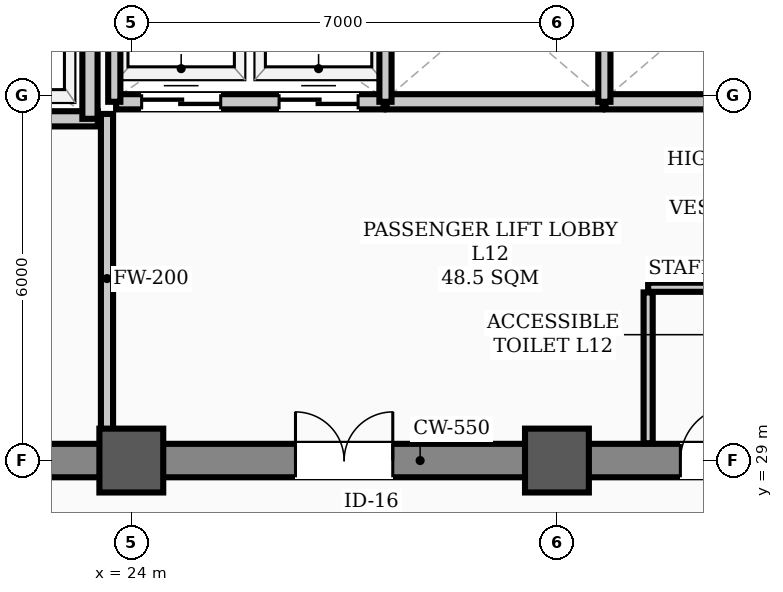
"""IFC4 building model, lengths in metres.
Left out: names, types, materials, properties, quantities, classifications, styles, units other than length and angle.
Written with IfcOpenShell. Run it as: python <this file> out.ifc"""

import sys

from ifc_helpers import new_model, si_unit, direction, frame, frame_2d, origin, origin_2d, place, context, subcontext, project, spatial, rectangle, hollow_rectangle, extrude, element, fill, save


model = new_model("IFC4")
c1 = context("Model", 3, precision=1e-05, world=origin(), true_north=direction((0.0, 1.0)))
c2 = subcontext(c1, "Body", "Model", "MODEL_VIEW")
j1 = project(units=[si_unit("LENGTHUNIT", "METRE"), si_unit("PLANEANGLEUNIT", "RADIAN")], contexts=[c1])
p1 = place(None, origin())
s1 = spatial("IfcSite", under=j1, at=p1, CompositionType="ELEMENT")
p2 = place(p1, origin())
s2 = spatial("IfcBuilding", under=s1, at=p2, CompositionType="ELEMENT")
p3 = place(p2, frame((0.0, 0.0, 49.9)))
s3 = spatial("IfcBuildingStorey", under=s2, at=p3, CompositionType="ELEMENT", Elevation=49.9)
for number, where, z_axis, x_axis in (
    (1, (24.0, 29.0, 0.0), (0.0, 0.0, 1.0), (1.0, 0.0, 0.0)),
    (2, (31.0, 29.0, 0.0), (0.0, 0.0, 1.0), (1.0, 0.0, 0.0)),
):
    element("IfcColumn", number, at=place(p3, frame(where, z_axis=z_axis, x_axis=x_axis)), inside=s3, PredefinedType="COLUMN", context=c2, shape_type="SweptSolid", body=[
        extrude(hollow_rectangle(XDim=1.05, YDim=1.05, WallThickness=0.038, InnerFilletRadius=0.019, OuterFilletRadius=0.057, at=origin_2d()), origin(), (0.0, 0.0, 1.0), 3.9),
    ])
p4 = place(p3, frame((13.5, 29.0, 0.0), z_axis=(0.0, 0.0, 1.0), x_axis=(1.0, 0.0, 0.0)))
e3 = element("IfcWall", 3, at=p4, inside=s3, PredefinedType="SHEAR", context=c2, shape_type="SweptSolid", body=[
    extrude(rectangle(XDim=30.5, YDim=0.55, at=frame_2d((15.25, 0.0))), origin(), (0.0, 0.0, 1.0), 3.66),
])
p5 = place(p4, frame((1.75, 0.0, 0.0)))
e4 = element("IfcOpeningElement", 4, at=p5, cuts=e3, PredefinedType="OPENING", context=c2, shape_type="SweptSolid", body=[
    extrude(rectangle(XDim=1.1, YDim=2.08, at=frame_2d((0.55, 1.04))), frame((0.0, 0.285, 0.0), z_axis=(0.0, -1.0, 0.0), x_axis=(1.0, 0.0, 0.0)), (0.0, 0.0, 1.0), 0.57),
])
p6 = place(p4, frame((26.7, 0.0, 0.0)))
e5 = element("IfcOpeningElement", 5, at=p6, cuts=e3, PredefinedType="OPENING", context=c2, shape_type="SweptSolid", body=[
    extrude(rectangle(XDim=1.1, YDim=2.08, at=frame_2d((0.55, 1.04))), frame((0.0, 0.285, 0.0), z_axis=(0.0, -1.0, 0.0), x_axis=(1.0, 0.0, 0.0)), (0.0, 0.0, 1.0), 0.57),
])
p7 = place(p4, frame((6.8, 0.0, 0.0)))
e6 = element("IfcOpeningElement", 6, at=p7, cuts=e3, PredefinedType="OPENING", context=c2, shape_type="SweptSolid", body=[
    extrude(rectangle(XDim=1.1, YDim=2.08, at=frame_2d((0.55, 1.04))), frame((0.0, 0.285, 0.0), z_axis=(0.0, -1.0, 0.0), x_axis=(1.0, 0.0, 0.0)), (0.0, 0.0, 1.0), 0.57),
])
p8 = place(p4, frame((13.2, 0.0, 0.0)))
e7 = element("IfcOpeningElement", 7, at=p8, cuts=e3, PredefinedType="OPENING", context=c2, shape_type="SweptSolid", body=[
    extrude(rectangle(XDim=1.6, YDim=2.08, at=frame_2d((0.8, 1.04))), frame((0.0, 0.285, 0.0), z_axis=(0.0, -1.0, 0.0), x_axis=(1.0, 0.0, 0.0)), (0.0, 0.0, 1.0), 0.57),
])
p9 = place(p4, frame((19.53, 0.0, 0.0)))
e8 = element("IfcOpeningElement", 8, at=p9, cuts=e3, PredefinedType="OPENING", context=c2, shape_type="SweptSolid", body=[
    extrude(rectangle(XDim=0.9, YDim=2.08, at=frame_2d((0.45, 1.04))), frame((0.0, 0.285, 0.0), z_axis=(0.0, -1.0, 0.0), x_axis=(1.0, 0.0, 0.0)), (0.0, 0.0, 1.0), 0.57),
])
p10 = place(p4, frame((21.57, 0.0, 0.0)))
e9 = element("IfcOpeningElement", 9, at=p10, cuts=e3, PredefinedType="OPENING", context=c2, shape_type="SweptSolid", body=[
    extrude(rectangle(XDim=0.9, YDim=2.08, at=frame_2d((0.45, 1.04))), frame((0.0, 0.285, 0.0), z_axis=(0.0, -1.0, 0.0), x_axis=(1.0, 0.0, 0.0)), (0.0, 0.0, 1.0), 0.57),
])
p11 = place(p3, frame((18.1, 34.62, 0.0), z_axis=(0.0, 0.0, 1.0), x_axis=(1.0, 0.0, 0.0)))
e10 = element("IfcWall", 10, at=p11, inside=s3, PredefinedType="STANDARD", context=c2, shape_type="SweptSolid", body=[
    extrude(rectangle(XDim=5.35, YDim=0.25, at=frame_2d((2.675, 0.0))), origin(), (0.0, 0.0, 1.0), 3.66),
])
p12 = place(p11, frame((0.85, 0.0, 0.0)))
e11 = element("IfcOpeningElement", 11, at=p12, cuts=e10, PredefinedType="OPENING", context=c2, shape_type="SweptSolid", body=[
    extrude(rectangle(XDim=1.1, YDim=2.08, at=frame_2d((0.55, 1.04))), frame((0.0, 0.135, 0.0), z_axis=(0.0, -1.0, 0.0), x_axis=(1.0, 0.0, 0.0)), (0.0, 0.0, 1.0), 0.27),
])
p13 = place(p11, frame((3.45, 0.0, 0.0)))
e12 = element("IfcOpeningElement", 12, at=p13, cuts=e10, PredefinedType="OPENING", context=c2, shape_type="SweptSolid", body=[
    extrude(rectangle(XDim=1.1, YDim=2.08, at=frame_2d((0.55, 1.04))), frame((0.0, 0.135, 0.0), z_axis=(0.0, -1.0, 0.0), x_axis=(1.0, 0.0, 0.0)), (0.0, 0.0, 1.0), 0.27),
])
p14 = place(p3, frame((23.32, 34.62, 0.0), z_axis=(0.0, 0.0, 1.0), x_axis=(0.0, 1.0, 0.0)))
e13 = element("IfcWall", 13, at=p14, inside=s3, PredefinedType="STANDARD", context=c2, shape_type="SweptSolid", body=[
    extrude(rectangle(XDim=3.33, YDim=0.25, at=frame_2d((1.665, 0.0))), origin(), (0.0, 0.0, 1.0), 2.24),
])
p15 = place(p3, frame((23.75, 34.9, 0.0), z_axis=(0.0, 0.0, 1.0), x_axis=(1.0, 0.0, 0.0)))
e14 = element("IfcWall", 14, at=p15, inside=s3, PredefinedType="STANDARD", context=c2, shape_type="SweptSolid", body=[
    extrude(rectangle(XDim=4.4, YDim=0.25, at=frame_2d((2.2, 0.0))), origin(), (0.0, 0.0, 1.0), 3.66),
])
p16 = place(p15, frame((0.42, 0.0, 0.0)))
e15 = element("IfcOpeningElement", 15, at=p16, cuts=e14, PredefinedType="OPENING", context=c2, shape_type="SweptSolid", body=[
    extrude(rectangle(XDim=1.3, YDim=2.08, at=frame_2d((0.65, 1.04))), frame((0.0, 0.135, 0.0), z_axis=(0.0, -1.0, 0.0), x_axis=(1.0, 0.0, 0.0)), (0.0, 0.0, 1.0), 0.27),
])
p17 = place(p15, frame((2.68, 0.0, 0.0)))
e16 = element("IfcOpeningElement", 16, at=p17, cuts=e14, PredefinedType="OPENING", context=c2, shape_type="SweptSolid", body=[
    extrude(rectangle(XDim=1.3, YDim=2.08, at=frame_2d((0.65, 1.04))), frame((0.0, 0.135, 0.0), z_axis=(0.0, -1.0, 0.0), x_axis=(1.0, 0.0, 0.0)), (0.0, 0.0, 1.0), 0.27),
])
p18 = place(p3, frame((28.2, 34.9, 0.0), z_axis=(0.0, 0.0, 1.0), x_axis=(1.0, 0.0, 0.0)))
e17 = element("IfcWall", 17, at=p18, inside=s3, PredefinedType="STANDARD", context=c2, shape_type="SweptSolid", body=[
    extrude(rectangle(XDim=3.55, YDim=0.25, at=frame_2d((1.775, 0.0))), origin(), (0.0, 0.0, 1.0), 3.66),
])
p19 = place(p3, frame((31.8, 34.9, 0.0), z_axis=(0.0, 0.0, 1.0), x_axis=(1.0, 0.0, 0.0)))
e18 = element("IfcWall", 18, at=p19, inside=s3, PredefinedType="STANDARD", context=c2, shape_type="SweptSolid", body=[
    extrude(rectangle(XDim=3.6, YDim=0.25, at=frame_2d((1.8, 0.0))), origin(), (0.0, 0.0, 1.0), 3.66),
])
p20 = place(p3, frame((32.5, 31.85, 0.0), z_axis=(0.0, 0.0, 1.0), x_axis=(1.0, 0.0, 0.0)))
e19 = element("IfcWall", 19, at=p20, inside=s3, PredefinedType="PARTITIONING", context=c2, shape_type="SweptSolid", body=[
    extrude(rectangle(XDim=4.1, YDim=0.15, at=frame_2d((2.05, 0.0))), origin(), (0.0, 0.0, 1.0), 3.66),
])
p21 = place(p3, frame((23.6, 29.285, 0.0), z_axis=(0.0, 0.0, 1.0), x_axis=(0.0, 1.0, 0.0)))
e20 = element("IfcWall", 20, at=p21, inside=s3, PredefinedType="STANDARD", context=c2, shape_type="SweptSolid", body=[
    extrude(rectangle(XDim=5.415, YDim=0.2, at=frame_2d((2.708, 0.0))), origin(), (0.0, 0.0, 1.0), 2.24),
])
p22 = place(p3, frame((32.5, 29.285, 0.0), z_axis=(0.0, 0.0, 1.0), x_axis=(0.0, 1.0, 0.0)))
e21 = element("IfcWall", 21, at=p22, inside=s3, PredefinedType="PARTITIONING", context=c2, shape_type="SweptSolid", body=[
    extrude(rectangle(XDim=2.48, YDim=0.15, at=frame_2d((1.24, 0.0))), origin(), (0.0, 0.0, 1.0), 2.24),
])
for number, where, z_axis, x_axis in (
    (22, (23.72, 34.9, 0.0), (0.0, 0.0, 1.0), (0.0, 1.0, 0.0)),
    (23, (28.18, 34.9, 0.0), (0.0, 0.0, 1.0), (0.0, 1.0, 0.0)),
    (24, (31.78, 34.9, 0.0), (0.0, 0.0, 1.0), (0.0, 1.0, 0.0)),
):
    element("IfcWall", number, at=place(p3, frame(where, z_axis=z_axis, x_axis=x_axis)), inside=s3, PredefinedType="STANDARD", context=c2, shape_type="SweptSolid", body=[
        extrude(rectangle(XDim=3.12, YDim=0.2, at=frame_2d((1.56, 0.0))), origin(), (0.0, 0.0, 1.0), 2.24),
    ])
p23 = place(p8, origin())
e25 = element("IfcDoor", 25, at=p23, inside=s3, OperationType="DOUBLE_DOOR_SINGLE_SWING", PredefinedType="DOOR", context=c2, shape_type="SweptSolid", body=[
    extrude(rectangle(XDim=1.6, YDim=2.08, at=frame_2d((0.8, 1.04))), frame((0.0, 0.025, 0.0), z_axis=(0.0, -1.0, 0.0), x_axis=(1.0, 0.0, 0.0)), (0.0, 0.0, 1.0), 0.05),
])
fill(e7, e25)
p24 = place(p9, origin())
e26 = element("IfcDoor", 26, at=p24, inside=s3, OperationType="SINGLE_SWING_RIGHT", PredefinedType="DOOR", context=c2, shape_type="SweptSolid", body=[
    extrude(rectangle(XDim=0.9, YDim=2.08, at=frame_2d((0.45, 1.04))), frame((0.0, 0.025, 0.0), z_axis=(0.0, -1.0, 0.0), x_axis=(1.0, 0.0, 0.0)), (0.0, 0.0, 1.0), 0.05),
])
fill(e8, e26)
p25 = place(p16, origin())
e27 = element("IfcDoor", 27, at=p25, inside=s3, OperationType="DOUBLE_DOOR_SLIDING", PredefinedType="DOOR", context=c2, shape_type="SweptSolid", body=[
    extrude(rectangle(XDim=1.3, YDim=2.08, at=frame_2d((0.65, 1.04))), frame((0.0, 0.025, 0.0), z_axis=(0.0, -1.0, 0.0), x_axis=(1.0, 0.0, 0.0)), (0.0, 0.0, 1.0), 0.05),
])
fill(e15, e27)
p26 = place(p17, origin())
e28 = element("IfcDoor", 28, at=p26, inside=s3, OperationType="DOUBLE_DOOR_SLIDING", PredefinedType="DOOR", context=c2, shape_type="SweptSolid", body=[
    extrude(rectangle(XDim=1.3, YDim=2.08, at=frame_2d((0.65, 1.04))), frame((0.0, 0.025, 0.0), z_axis=(0.0, -1.0, 0.0), x_axis=(1.0, 0.0, 0.0)), (0.0, 0.0, 1.0), 0.05),
])
fill(e16, e28)
save(model, sys.argv[1])
